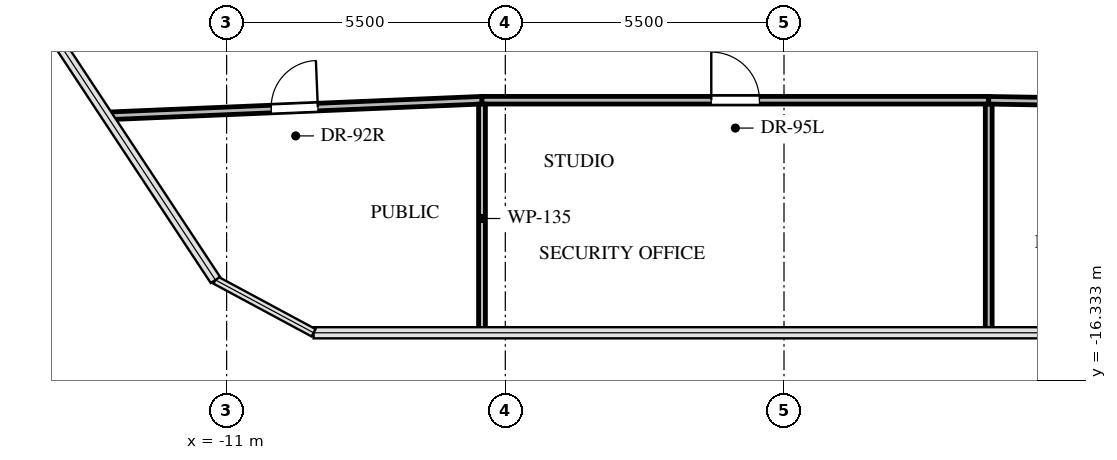
"""IFC4 building model, lengths in metres.
Left out: names, types, materials, properties, quantities, classifications, styles, units other than length and angle.
Written with IfcOpenShell. Run it as: python <this file> out.ifc"""

import sys

from ifc_helpers import new_model, si_unit, direction, frame, frame_2d, origin, place, context, subcontext, project, spatial, rectangle, extrude, source, transform, mapped, element, fill, save


model = new_model("IFC4")
c1 = context("Model", 3, precision=1e-05, world=origin(), true_north=direction((0.0, 1.0)))
c2 = subcontext(c1, "Body", "Model", "MODEL_VIEW")
j1 = project(units=[si_unit("LENGTHUNIT", "METRE"), si_unit("PLANEANGLEUNIT", "RADIAN")], contexts=[c1])
p1 = place(None, origin())
s1 = spatial("IfcSite", under=j1, at=p1, CompositionType="ELEMENT")
p2 = place(p1, origin())
s2 = spatial("IfcBuilding", under=s1, at=p2, CompositionType="ELEMENT")
p3 = place(p2, frame((0.0, 0.0, 5.2)))
s3 = spatial("IfcBuildingStorey", under=s2, at=p3, CompositionType="ELEMENT", Elevation=5.2)
p4 = place(p3, frame((-13.359, -11.12, 0.0), z_axis=(0.0, 0.0, 1.0), x_axis=(0.999125858918, 0.041803325715, 0.0)))
e1 = element("IfcWall", 1, at=p4, inside=s3, PredefinedType="PARTITIONING", context=c2, shape_type="SweptSolid", body=[
    extrude(rectangle(XDim=7.406, YDim=0.15, at=frame_2d((3.703, 0.0))), origin(), (0.0, 0.0, 1.0), 3.757),
])
p5 = place(p4, frame((3.243, 0.0, 0.0)))
e2 = element("IfcOpeningElement", 2, at=p5, cuts=e1, PredefinedType="OPENING", context=c2, shape_type="SweptSolid", body=[
    extrude(rectangle(XDim=0.92, YDim=2.1, at=frame_2d((0.46, 1.05))), frame((0.0, 0.085, 0.0), z_axis=(0.0, -1.0, 0.0), x_axis=(1.0, 0.0, 0.0)), (0.0, 0.0, 1.0), 0.17),
])
p6 = place(p3, frame((-5.96, -10.81, 0.0), z_axis=(0.0, 0.0, 1.0), x_axis=(1.0, 0.0, 0.0)))
e3 = element("IfcWall", 3, at=p6, inside=s3, PredefinedType="PARTITIONING", context=c2, shape_type="SweptSolid", body=[
    extrude(rectangle(XDim=10.0, YDim=0.15, at=frame_2d((5.0, 0.0))), origin(), (0.0, 0.0, 1.0), 3.757),
])
p7 = place(p6, frame((4.525, 0.0, 0.0)))
e4 = element("IfcOpeningElement", 4, at=p7, cuts=e3, PredefinedType="OPENING", context=c2, shape_type="SweptSolid", body=[
    extrude(rectangle(XDim=0.95, YDim=2.1, at=frame_2d((0.475, 1.05))), frame((0.0, 0.085, 0.0), z_axis=(0.0, -1.0, 0.0), x_axis=(1.0, 0.0, 0.0)), (0.0, 0.0, 1.0), 0.17),
])
p8 = place(p3, frame((4.04, -10.811, 0.0), z_axis=(0.0, 0.0, 1.0), x_axis=(0.999863885947, -0.016498775082, 0.0)))
e5 = element("IfcWall", 5, at=p8, inside=s3, PredefinedType="PARTITIONING", context=c2, shape_type="SweptSolid", body=[
    extrude(rectangle(XDim=8.967, YDim=0.15, at=frame_2d((4.484, 0.0))), origin(), (0.0, 0.0, 1.0), 3.757),
])
p9 = place(p8, frame((4.024, 0.0, 0.0)))
e6 = element("IfcOpeningElement", 6, at=p9, cuts=e5, PredefinedType="OPENING", context=c2, shape_type="SweptSolid", body=[
    extrude(rectangle(XDim=0.92, YDim=2.1, at=frame_2d((0.46, 1.05))), frame((0.0, 0.085, 0.0), z_axis=(0.0, -1.0, 0.0), x_axis=(1.0, 0.0, 0.0)), (0.0, 0.0, 1.0), 0.17),
])
p10 = place(p3, frame((-5.96, -10.889, 0.0), z_axis=(0.0, 0.0, 1.0), x_axis=(0.0, -1.0, 0.0)))
e7 = element("IfcWall", 7, at=p10, inside=s3, PredefinedType="PARTITIONING", context=c2, shape_type="SweptSolid", body=[
    extrude(rectangle(XDim=4.511, YDim=0.135, at=frame_2d((2.255, 0.0))), origin(), (0.0, 0.0, 1.0), 3.757),
])
p11 = place(p3, frame((4.04, -10.89, 0.0), z_axis=(0.0, 0.0, 1.0), x_axis=(0.0, -1.0, 0.0)))
e8 = element("IfcWall", 8, at=p11, inside=s3, PredefinedType="PARTITIONING", context=c2, shape_type="SweptSolid", body=[
    extrude(rectangle(XDim=4.51, YDim=0.135, at=frame_2d((2.255, 0.0))), origin(), (0.0, 0.0, 1.0), 4.835),
])
m1 = source(origin(), c2, "Body", "SweptSolid", [
    extrude(rectangle(XDim=0.92, YDim=2.1, at=frame_2d((0.46, 1.05))), frame((0.0, 0.025, 0.0), z_axis=(0.0, -1.0, 0.0), x_axis=(1.0, 0.0, 0.0)), (0.0, 0.0, 1.0), 0.05),
])
p12 = place(p5, origin())
e9 = element("IfcDoor", 9, at=p12, inside=s3, OperationType="SINGLE_SWING_RIGHT", PredefinedType="DOOR", context=c2, shape_type="MappedRepresentation", body=[
    mapped(m1, transform((0.0, 0.0, 0.0), x_axis=(1.0, 0.0, 0.0), y_axis=(0.0, 1.0, 0.0), z_axis=(0.0, 0.0, 1.0), scale=1.0)),
])
fill(e2, e9)
m2 = source(origin(), c2, "Body", "SweptSolid", [
    extrude(rectangle(XDim=0.95, YDim=2.1, at=frame_2d((0.475, 1.05))), frame((0.0, 0.025, 0.0), z_axis=(0.0, -1.0, 0.0), x_axis=(1.0, 0.0, 0.0)), (0.0, 0.0, 1.0), 0.05),
])
p13 = place(p7, origin())
e10 = element("IfcDoor", 10, at=p13, inside=s3, OperationType="SINGLE_SWING_LEFT", PredefinedType="DOOR", context=c2, shape_type="MappedRepresentation", body=[
    mapped(m2, transform((0.0, 0.0, 0.0), x_axis=(1.0, 0.0, 0.0), y_axis=(0.0, 1.0, 0.0), z_axis=(0.0, 0.0, 1.0), scale=1.0)),
])
fill(e4, e10)
save(model, sys.argv[1])
